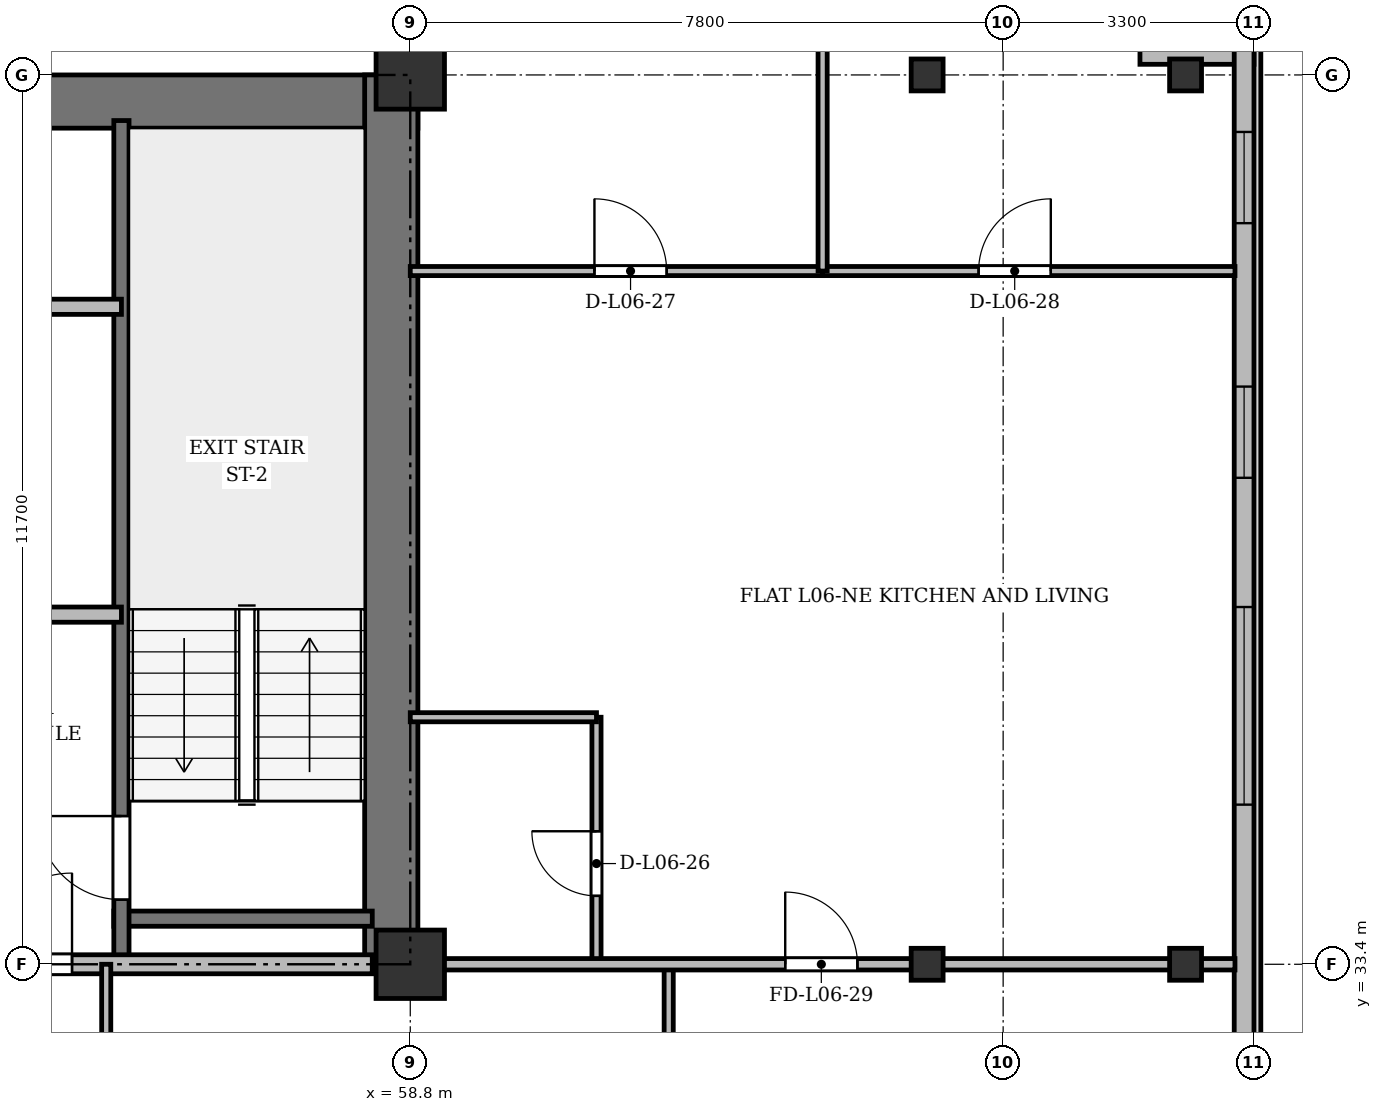
"""IFC4 building model, lengths in metres.
Left out: names, types, materials, properties, quantities, classifications, styles, units other than length and angle.
Written with IfcOpenShell. Run it as: python <this file> out.ifc"""

import sys

from ifc_helpers import new_model, si_unit, direction, frame, frame_2d, origin, origin_2d, place, context, subcontext, project, spatial, rectangle, i_section, extrude, source, transform, mapped, element, fill, save


model = new_model("IFC4")
c1 = context("Model", 3, precision=1e-05, world=origin(), true_north=direction((0.0, 1.0)))
c2 = subcontext(c1, "Body", "Model", "MODEL_VIEW")
j1 = project(units=[si_unit("LENGTHUNIT", "METRE"), si_unit("PLANEANGLEUNIT", "RADIAN")], contexts=[c1])
p1 = place(None, origin())
s1 = spatial("IfcSite", under=j1, at=p1, CompositionType="ELEMENT")
p2 = place(p1, origin())
s2 = spatial("IfcBuilding", under=s1, at=p2, CompositionType="ELEMENT")
p3 = place(p2, frame((0.0, 0.0, 27.1)))
s3 = spatial("IfcBuildingStorey", under=s2, at=p3, CompositionType="ELEMENT", Elevation=27.1)
m1 = source(origin(), c2, "Body", "SweptSolid", [
    extrude(rectangle(XDim=0.9, YDim=0.9, at=origin_2d()), origin(), (0.0, 0.0, 1.0), 3.6),
])
for number, where, z_axis, x_axis in (
    (1, (58.8, 33.4, 0.0), (0.0, 0.0, 1.0), (1.0, 0.0, 0.0)),
    (2, (58.8, 45.1, 0.0), (0.0, 0.0, 1.0), (1.0, 0.0, 0.0)),
):
    element("IfcColumn", number, at=place(p3, frame(where, z_axis=z_axis, x_axis=x_axis)), inside=s3, PredefinedType="COLUMN", context=c2, shape_type="MappedRepresentation", body=[
        mapped(m1, transform((0.0, 0.0, 0.0), x_axis=(1.0, 0.0, 0.0), y_axis=(0.0, 1.0, 0.0), z_axis=(0.0, 0.0, 1.0), scale=1.0)),
    ])
m2 = source(origin(), c2, "Body", "SweptSolid", [
    extrude(i_section(OverallWidth=0.42, OverallDepth=0.42, WebThickness=0.026, FlangeThickness=0.04, at=origin_2d()), origin(), (0.0, 0.0, 1.0), 3.6),
])
for number, where, z_axis, x_axis in (
    (3, (65.6, 33.4, 0.0), (0.0, 0.0, 1.0), (1.0, 0.0, 0.0)),
    (4, (65.6, 45.1, 0.0), (0.0, 0.0, 1.0), (1.0, 0.0, 0.0)),
    (5, (69.0, 33.4, 0.0), (0.0, 0.0, 1.0), (1.0, 0.0, 0.0)),
    (6, (69.0, 45.1, 0.0), (0.0, 0.0, 1.0), (1.0, 0.0, 0.0)),
):
    element("IfcColumn", number, at=place(p3, frame(where, z_axis=z_axis, x_axis=x_axis)), inside=s3, PredefinedType="COLUMN", context=c2, shape_type="MappedRepresentation", body=[
        mapped(m2, transform((0.0, 0.0, 0.0), x_axis=(1.0, 0.0, 0.0), y_axis=(0.0, 1.0, 0.0), z_axis=(0.0, 0.0, 1.0), scale=1.0)),
    ])
p4 = place(p3, frame((68.4, 45.37, 0.0), z_axis=(0.0, 0.0, 1.0), x_axis=(1.0, 0.0, 0.0)))
e7 = element("IfcWall", 7, at=p4, inside=s3, PredefinedType="SOLIDWALL", context=c2, shape_type="SweptSolid", body=[
    extrude(rectangle(XDim=1.5, YDim=0.26, at=frame_2d((0.75, 0.0))), origin(), (0.0, 0.0, 1.0), 2.69),
])
p5 = place(p3, frame((69.77, 45.5, 0.0), z_axis=(0.0, 0.0, 1.0), x_axis=(0.0, -1.0, 0.0)))
e8 = element("IfcWall", 8, at=p5, inside=s3, PredefinedType="SOLIDWALL", context=c2, shape_type="SweptSolid", body=[
    extrude(rectangle(XDim=39.6, YDim=0.26, at=frame_2d((19.8, 0.0))), origin(), (0.0, 0.0, 1.0), 3.34),
])
p6 = place(p5, frame((36.95, 0.0, 0.92)))
e9 = element("IfcOpeningElement", 9, at=p6, cuts=e8, PredefinedType="OPENING", context=c2, shape_type="SweptSolid", body=[
    extrude(rectangle(XDim=1.2, YDim=1.65, at=frame_2d((0.6, 0.825))), frame((0.0, 0.14, 0.0), z_axis=(0.0, -1.0, 0.0), x_axis=(1.0, 0.0, 0.0)), (0.0, 0.0, 1.0), 0.28),
])
p7 = place(p5, frame((32.8, 0.0, 0.92)))
e10 = element("IfcOpeningElement", 10, at=p7, cuts=e8, PredefinedType="OPENING", context=c2, shape_type="SweptSolid", body=[
    extrude(rectangle(XDim=2.6, YDim=1.9, at=frame_2d((1.3, 0.95))), frame((0.0, 0.14, 0.0), z_axis=(0.0, -1.0, 0.0), x_axis=(1.0, 0.0, 0.0)), (0.0, 0.0, 1.0), 0.28),
])
p8 = place(p5, frame((28.6, 0.0, 0.92)))
e11 = element("IfcOpeningElement", 11, at=p8, cuts=e8, PredefinedType="OPENING", context=c2, shape_type="SweptSolid", body=[
    extrude(rectangle(XDim=2.6, YDim=1.9, at=frame_2d((1.3, 0.95))), frame((0.0, 0.14, 0.0), z_axis=(0.0, -1.0, 0.0), x_axis=(1.0, 0.0, 0.0)), (0.0, 0.0, 1.0), 0.28),
])
p9 = place(p5, frame((7.4, 0.0, 0.92)))
e12 = element("IfcOpeningElement", 12, at=p9, cuts=e8, PredefinedType="OPENING", context=c2, shape_type="SweptSolid", body=[
    extrude(rectangle(XDim=2.6, YDim=1.9, at=frame_2d((1.3, 0.95))), frame((0.0, 0.14, 0.0), z_axis=(0.0, -1.0, 0.0), x_axis=(1.0, 0.0, 0.0)), (0.0, 0.0, 1.0), 0.28),
])
p10 = place(p5, frame((4.5, 0.0, 0.92)))
e13 = element("IfcOpeningElement", 13, at=p10, cuts=e8, PredefinedType="OPENING", context=c2, shape_type="SweptSolid", body=[
    extrude(rectangle(XDim=1.2, YDim=1.65, at=frame_2d((0.6, 0.825))), frame((0.0, 0.14, 0.0), z_axis=(0.0, -1.0, 0.0), x_axis=(1.0, 0.0, 0.0)), (0.0, 0.0, 1.0), 0.28),
])
p11 = place(p5, frame((1.15, 0.0, 0.92)))
e14 = element("IfcOpeningElement", 14, at=p11, cuts=e8, PredefinedType="OPENING", context=c2, shape_type="SweptSolid", body=[
    extrude(rectangle(XDim=1.2, YDim=1.65, at=frame_2d((0.6, 0.825))), frame((0.0, 0.14, 0.0), z_axis=(0.0, -1.0, 0.0), x_axis=(1.0, 0.0, 0.0)), (0.0, 0.0, 1.0), 0.28),
])
p12 = place(p3, frame((15.5, 44.75, 0.0), z_axis=(0.0, 0.0, 1.0), x_axis=(1.0, 0.0, 0.0)))
e15 = element("IfcWall", 15, at=p12, inside=s3, PredefinedType="SHEAR", context=c2, shape_type="SweptSolid", body=[
    extrude(rectangle(XDim=43.4, YDim=0.7, at=frame_2d((21.7, 0.0))), origin(), (0.0, 0.0, 1.0), 3.34),
])
p13 = place(p3, frame((58.55, 33.4, 0.0), z_axis=(0.0, 0.0, 1.0), x_axis=(0.0, 1.0, 0.0)))
e16 = element("IfcWall", 16, at=p13, inside=s3, PredefinedType="SHEAR", context=c2, shape_type="SweptSolid", body=[
    extrude(rectangle(XDim=11.7, YDim=0.7, at=frame_2d((5.85, 0.0))), origin(), (0.0, 0.0, 1.0), 3.34),
])
p14 = place(p3, frame((54.9, 34.0, 0.0), z_axis=(0.0, 0.0, 1.0), x_axis=(1.0, 0.0, 0.0)))
e17 = element("IfcWall", 17, at=p14, inside=s3, PredefinedType="SHEAR", context=c2, shape_type="SweptSolid", body=[
    extrude(rectangle(XDim=3.4, YDim=0.2, at=frame_2d((1.7, 0.0))), origin(), (0.0, 0.0, 1.0), 3.34),
])
p15 = place(p3, frame((55.0, 33.4, 0.0), z_axis=(0.0, 0.0, 1.0), x_axis=(0.0, 1.0, 0.0)))
e18 = element("IfcWall", 18, at=p15, inside=s3, PredefinedType="SHEAR", context=c2, shape_type="SweptSolid", body=[
    extrude(rectangle(XDim=11.1, YDim=0.2, at=frame_2d((5.55, 0.0))), origin(), (0.0, 0.0, 1.0), 3.34),
])
p16 = place(p15, frame((0.85, 0.0, 0.0)))
e19 = element("IfcOpeningElement", 19, at=p16, cuts=e18, PredefinedType="OPENING", context=c2, shape_type="SweptSolid", body=[
    extrude(rectangle(XDim=1.1, YDim=2.15, at=frame_2d((0.55, 1.075))), frame((0.0, 0.11, 0.0), z_axis=(0.0, -1.0, 0.0), x_axis=(1.0, 0.0, 0.0)), (0.0, 0.0, 1.0), 0.22),
])
p17 = place(p3, frame((47.15, 42.05, 0.0), z_axis=(0.0, 0.0, 1.0), x_axis=(1.0, 0.0, 0.0)))
e20 = element("IfcWall", 20, at=p17, inside=s3, PredefinedType="SOLIDWALL", context=c2, shape_type="SweptSolid", body=[
    extrude(rectangle(XDim=7.85, YDim=0.2, at=frame_2d((3.925, 0.0))), origin(), (0.0, 0.0, 1.0), 2.752),
])
p18 = place(p17, frame((0.75, 0.0, 0.0)))
e21 = element("IfcOpeningElement", 21, at=p18, cuts=e20, PredefinedType="OPENING", context=c2, shape_type="SweptSolid", body=[
    extrude(rectangle(XDim=0.9, YDim=2.1, at=frame_2d((0.45, 1.05))), frame((0.0, 0.11, 0.0), z_axis=(0.0, -1.0, 0.0), x_axis=(1.0, 0.0, 0.0)), (0.0, 0.0, 1.0), 0.22),
])
p19 = place(p17, frame((3.85, 0.0, 0.0)))
e22 = element("IfcOpeningElement", 22, at=p19, cuts=e20, PredefinedType="OPENING", context=c2, shape_type="SweptSolid", body=[
    extrude(rectangle(XDim=0.9, YDim=2.1, at=frame_2d((0.45, 1.05))), frame((0.0, 0.11, 0.0), z_axis=(0.0, -1.0, 0.0), x_axis=(1.0, 0.0, 0.0)), (0.0, 0.0, 1.0), 0.22),
])
p20 = place(p3, frame((52.45, 38.0, 0.0), z_axis=(0.0, 0.0, 1.0), x_axis=(1.0, 0.0, 0.0)))
e23 = element("IfcWall", 23, at=p20, inside=s3, PredefinedType="PARTITIONING", context=c2, shape_type="SweptSolid", body=[
    extrude(rectangle(XDim=2.55, YDim=0.2, at=frame_2d((1.275, 0.0))), origin(), (0.0, 0.0, 1.0), 3.34),
])
p21 = place(p3, frame((47.15, 33.4, 0.0), z_axis=(0.0, 0.0, 1.0), x_axis=(1.0, 0.0, 0.0)))
e24 = element("IfcWall", 24, at=p21, inside=s3, PredefinedType="PARTITIONING", context=c2, shape_type="SweptSolid", body=[
    extrude(rectangle(XDim=11.15, YDim=0.25, at=frame_2d((5.575, 0.0))), origin(), (0.0, 0.0, 1.0), 2.69),
])
p22 = place(p21, frame((0.7, 0.0, 0.0)))
e25 = element("IfcOpeningElement", 25, at=p22, cuts=e24, PredefinedType="OPENING", context=c2, shape_type="SweptSolid", body=[
    extrude(rectangle(XDim=0.95, YDim=2.15, at=frame_2d((0.475, 1.075))), frame((0.0, 0.135, 0.0), z_axis=(0.0, -1.0, 0.0), x_axis=(1.0, 0.0, 0.0)), (0.0, 0.0, 1.0), 0.27),
])
p23 = place(p21, frame((6.0, 0.0, 0.0)))
e26 = element("IfcOpeningElement", 26, at=p23, cuts=e24, PredefinedType="OPENING", context=c2, shape_type="SweptSolid", body=[
    extrude(rectangle(XDim=1.2, YDim=2.15, at=frame_2d((0.6, 1.075))), frame((0.0, 0.135, 0.0), z_axis=(0.0, -1.0, 0.0), x_axis=(1.0, 0.0, 0.0)), (0.0, 0.0, 1.0), 0.27),
])
for number, where, z_axis, x_axis in (
    (27, (62.2, 29.8, 0.0), (0.0, 0.0, 1.0), (0.0, 1.0, 0.0)),
    (28, (54.8, 29.8, 0.0), (0.0, 0.0, 1.0), (0.0, 1.0, 0.0)),
):
    element("IfcWall", number, at=place(p3, frame(where, z_axis=z_axis, x_axis=x_axis)), inside=s3, PredefinedType="PARTITIONING", context=c2, shape_type="SweptSolid", body=[
        extrude(rectangle(XDim=3.6, YDim=0.12, at=frame_2d((1.8, 0.0))), origin(), (0.0, 0.0, 1.0), 2.69),
    ])
p24 = place(p3, frame((61.25, 33.4, 0.0), z_axis=(0.0, 0.0, 1.0), x_axis=(0.0, 1.0, 0.0)))
e29 = element("IfcWall", 29, at=p24, inside=s3, PredefinedType="PARTITIONING", context=c2, shape_type="SweptSolid", body=[
    extrude(rectangle(XDim=3.25, YDim=0.12, at=frame_2d((1.625, 0.0))), origin(), (0.0, 0.0, 1.0), 2.69),
])
p25 = place(p24, frame((0.9, 0.0, 0.0)))
e30 = element("IfcOpeningElement", 30, at=p25, cuts=e29, PredefinedType="OPENING", context=c2, shape_type="SweptSolid", body=[
    extrude(rectangle(XDim=0.85, YDim=2.1, at=frame_2d((0.425, 1.05))), frame((0.0, 0.07, 0.0), z_axis=(0.0, -1.0, 0.0), x_axis=(1.0, 0.0, 0.0)), (0.0, 0.0, 1.0), 0.14),
])
p26 = place(p3, frame((58.8, 36.65, 0.0), z_axis=(0.0, 0.0, 1.0), x_axis=(1.0, 0.0, 0.0)))
e31 = element("IfcWall", 31, at=p26, inside=s3, PredefinedType="PARTITIONING", context=c2, shape_type="SweptSolid", body=[
    extrude(rectangle(XDim=2.45, YDim=0.12, at=frame_2d((1.225, 0.0))), origin(), (0.0, 0.0, 1.0), 2.752),
])
p27 = place(p3, frame((58.8, 42.52, 0.0), z_axis=(0.0, 0.0, 1.0), x_axis=(1.0, 0.0, 0.0)))
e32 = element("IfcWall", 32, at=p27, inside=s3, PredefinedType="PARTITIONING", context=c2, shape_type="SweptSolid", body=[
    extrude(rectangle(XDim=5.425, YDim=0.12, at=frame_2d((2.712, 0.0))), origin(), (0.0, 0.0, 1.0), 2.752),
])
p28 = place(p27, frame((2.423, 0.0, 0.0)))
e33 = element("IfcOpeningElement", 33, at=p28, cuts=e32, PredefinedType="OPENING", context=c2, shape_type="SweptSolid", body=[
    extrude(rectangle(XDim=0.95, YDim=2.15, at=frame_2d((0.475, 1.075))), frame((0.0, 0.07, 0.0), z_axis=(0.0, -1.0, 0.0), x_axis=(1.0, 0.0, 0.0)), (0.0, 0.0, 1.0), 0.14),
])
p29 = place(p3, frame((64.225, 42.52, 0.0), z_axis=(0.0, 0.0, 1.0), x_axis=(1.0, 0.0, 0.0)))
e34 = element("IfcWall", 34, at=p29, inside=s3, PredefinedType="PARTITIONING", context=c2, shape_type="SweptSolid", body=[
    extrude(rectangle(XDim=5.425, YDim=0.12, at=frame_2d((2.712, 0.0))), origin(), (0.0, 0.0, 1.0), 2.752),
])
p30 = place(p29, frame((2.052, 0.0, 0.0)))
e35 = element("IfcOpeningElement", 35, at=p30, cuts=e34, PredefinedType="OPENING", context=c2, shape_type="SweptSolid", body=[
    extrude(rectangle(XDim=0.95, YDim=2.15, at=frame_2d((0.475, 1.075))), frame((0.0, 0.07, 0.0), z_axis=(0.0, -1.0, 0.0), x_axis=(1.0, 0.0, 0.0)), (0.0, 0.0, 1.0), 0.14),
])
p31 = place(p3, frame((64.225, 42.52, 0.0), z_axis=(0.0, 0.0, 1.0), x_axis=(0.0, 1.0, 0.0)))
e36 = element("IfcWall", 36, at=p31, inside=s3, PredefinedType="PARTITIONING", context=c2, shape_type="SweptSolid", body=[
    extrude(rectangle(XDim=5.72, YDim=0.12, at=frame_2d((2.86, 0.0))), origin(), (0.0, 0.0, 1.0), 2.69),
])
p32 = place(p3, frame((58.8, 33.4, 0.0), z_axis=(0.0, 0.0, 1.0), x_axis=(1.0, 0.0, 0.0)))
e37 = element("IfcWall", 37, at=p32, inside=s3, PredefinedType="PARTITIONING", context=c2, shape_type="SweptSolid", body=[
    extrude(rectangle(XDim=10.85, YDim=0.15, at=frame_2d((5.425, 0.0))), origin(), (0.0, 0.0, 1.0), 2.69),
])
p33 = place(p32, frame((4.933, 0.0, 0.0)))
e38 = element("IfcOpeningElement", 38, at=p33, cuts=e37, PredefinedType="OPENING", context=c2, shape_type="SweptSolid", body=[
    extrude(rectangle(XDim=0.95, YDim=2.15, at=frame_2d((0.475, 1.075))), frame((0.0, 0.085, 0.0), z_axis=(0.0, -1.0, 0.0), x_axis=(1.0, 0.0, 0.0)), (0.0, 0.0, 1.0), 0.17),
])
p34 = place(p3, frame((58.8, 44.75, 0.0), z_axis=(0.0, 0.0, 1.0), x_axis=(0.0, 1.0, 0.0)))
e39 = element("IfcWall", 39, at=p34, inside=s3, PredefinedType="PARTITIONING", context=c2, shape_type="SweptSolid", body=[
    extrude(rectangle(XDim=3.61, YDim=0.15, at=frame_2d((1.805, 0.0))), origin(), (0.0, 0.0, 1.0), 2.752),
])
p35 = place(p34, frame((1.1, 0.0, 0.0)))
e40 = element("IfcOpeningElement", 40, at=p35, cuts=e39, PredefinedType="OPENING", context=c2, shape_type="SweptSolid", body=[
    extrude(rectangle(XDim=0.95, YDim=2.15, at=frame_2d((0.475, 1.075))), frame((0.0, 0.085, 0.0), z_axis=(0.0, -1.0, 0.0), x_axis=(1.0, 0.0, 0.0)), (0.0, 0.0, 1.0), 0.17),
])
m3 = source(origin(), c2, "Body", "SweptSolid", [
    extrude(rectangle(XDim=2.6, YDim=1.9, at=frame_2d((1.3, 0.95))), frame((0.0, 0.03, 0.0), z_axis=(0.0, -1.0, 0.0), x_axis=(1.0, 0.0, 0.0)), (0.0, 0.0, 1.0), 0.06),
])
p36 = place(p9, origin())
e41 = element("IfcWindow", 41, at=p36, inside=s3, PartitioningType="SINGLE_PANEL", PredefinedType="WINDOW", context=c2, shape_type="MappedRepresentation", body=[
    mapped(m3, transform((0.0, 0.0, 0.0), x_axis=(1.0, 0.0, 0.0), y_axis=(0.0, 1.0, 0.0), z_axis=(0.0, 0.0, 1.0), scale=1.0)),
])
fill(e12, e41)
m4 = source(origin(), c2, "Body", "SweptSolid", [
    extrude(rectangle(XDim=1.2, YDim=1.65, at=frame_2d((0.6, 0.825))), frame((0.0, 0.03, 0.0), z_axis=(0.0, -1.0, 0.0), x_axis=(1.0, 0.0, 0.0)), (0.0, 0.0, 1.0), 0.06),
])
p37 = place(p10, origin())
e42 = element("IfcWindow", 42, at=p37, inside=s3, PartitioningType="SINGLE_PANEL", PredefinedType="WINDOW", context=c2, shape_type="MappedRepresentation", body=[
    mapped(m4, transform((0.0, 0.0, 0.0), x_axis=(1.0, 0.0, 0.0), y_axis=(0.0, 1.0, 0.0), z_axis=(0.0, 0.0, 1.0), scale=1.0)),
])
fill(e13, e42)
p38 = place(p11, origin())
e43 = element("IfcWindow", 43, at=p38, inside=s3, PartitioningType="SINGLE_PANEL", PredefinedType="WINDOW", context=c2, shape_type="MappedRepresentation", body=[
    mapped(m4, transform((0.0, 0.0, 0.0), x_axis=(1.0, 0.0, 0.0), y_axis=(0.0, 1.0, 0.0), z_axis=(0.0, 0.0, 1.0), scale=1.0)),
])
fill(e14, e43)
m5 = source(origin(), c2, "Body", "SweptSolid", [
    extrude(rectangle(XDim=1.1, YDim=2.15, at=frame_2d((0.55, 1.075))), frame((0.0, 0.025, 0.0), z_axis=(0.0, -1.0, 0.0), x_axis=(1.0, 0.0, 0.0)), (0.0, 0.0, 1.0), 0.05),
])
p39 = place(p16, origin())
e44 = element("IfcDoor", 44, at=p39, inside=s3, OperationType="SINGLE_SWING_RIGHT", PredefinedType="DOOR", context=c2, shape_type="MappedRepresentation", body=[
    mapped(m5, transform((0.0, 0.0, 0.0), x_axis=(1.0, 0.0, 0.0), y_axis=(0.0, 1.0, 0.0), z_axis=(0.0, 0.0, 1.0), scale=1.0)),
])
fill(e19, e44)
m6 = source(origin(), c2, "Body", "SweptSolid", [
    extrude(rectangle(XDim=1.2, YDim=2.15, at=frame_2d((0.6, 1.075))), frame((0.0, 0.025, 0.0), z_axis=(0.0, -1.0, 0.0), x_axis=(1.0, 0.0, 0.0)), (0.0, 0.0, 1.0), 0.05),
])
p40 = place(p23, origin())
e45 = element("IfcDoor", 45, at=p40, inside=s3, OperationType="SINGLE_SWING_RIGHT", PredefinedType="DOOR", context=c2, shape_type="MappedRepresentation", body=[
    mapped(m6, transform((0.0, 0.0, 0.0), x_axis=(1.0, 0.0, 0.0), y_axis=(0.0, 1.0, 0.0), z_axis=(0.0, 0.0, 1.0), scale=1.0)),
])
fill(e26, e45)
m7 = source(origin(), c2, "Body", "SweptSolid", [
    extrude(rectangle(XDim=0.85, YDim=2.1, at=frame_2d((0.425, 1.05))), frame((0.0, 0.025, 0.0), z_axis=(0.0, -1.0, 0.0), x_axis=(1.0, 0.0, 0.0)), (0.0, 0.0, 1.0), 0.05),
])
p41 = place(p25, origin())
e46 = element("IfcDoor", 46, at=p41, inside=s3, OperationType="SINGLE_SWING_RIGHT", PredefinedType="DOOR", context=c2, shape_type="MappedRepresentation", body=[
    mapped(m7, transform((0.0, 0.0, 0.0), x_axis=(1.0, 0.0, 0.0), y_axis=(0.0, 1.0, 0.0), z_axis=(0.0, 0.0, 1.0), scale=1.0)),
])
fill(e30, e46)
m8 = source(origin(), c2, "Body", "SweptSolid", [
    extrude(rectangle(XDim=0.95, YDim=2.15, at=frame_2d((0.475, 1.075))), frame((0.0, 0.025, 0.0), z_axis=(0.0, -1.0, 0.0), x_axis=(1.0, 0.0, 0.0)), (0.0, 0.0, 1.0), 0.05),
])
p42 = place(p28, origin())
e47 = element("IfcDoor", 47, at=p42, inside=s3, OperationType="SINGLE_SWING_LEFT", PredefinedType="DOOR", context=c2, shape_type="MappedRepresentation", body=[
    mapped(m8, transform((0.0, 0.0, 0.0), x_axis=(1.0, 0.0, 0.0), y_axis=(0.0, 1.0, 0.0), z_axis=(0.0, 0.0, 1.0), scale=1.0)),
])
fill(e33, e47)
p43 = place(p30, origin())
e48 = element("IfcDoor", 48, at=p43, inside=s3, OperationType="SINGLE_SWING_RIGHT", PredefinedType="DOOR", context=c2, shape_type="MappedRepresentation", body=[
    mapped(m8, transform((0.0, 0.0, 0.0), x_axis=(1.0, 0.0, 0.0), y_axis=(0.0, 1.0, 0.0), z_axis=(0.0, 0.0, 1.0), scale=1.0)),
])
fill(e35, e48)
p44 = place(p33, origin())
e49 = element("IfcDoor", 49, at=p44, inside=s3, OperationType="SINGLE_SWING_LEFT", PredefinedType="DOOR", context=c2, shape_type="MappedRepresentation", body=[
    mapped(m8, transform((0.0, 0.0, 0.0), x_axis=(1.0, 0.0, 0.0), y_axis=(0.0, 1.0, 0.0), z_axis=(0.0, 0.0, 1.0), scale=1.0)),
])
fill(e38, e49)
save(model, sys.argv[1])
